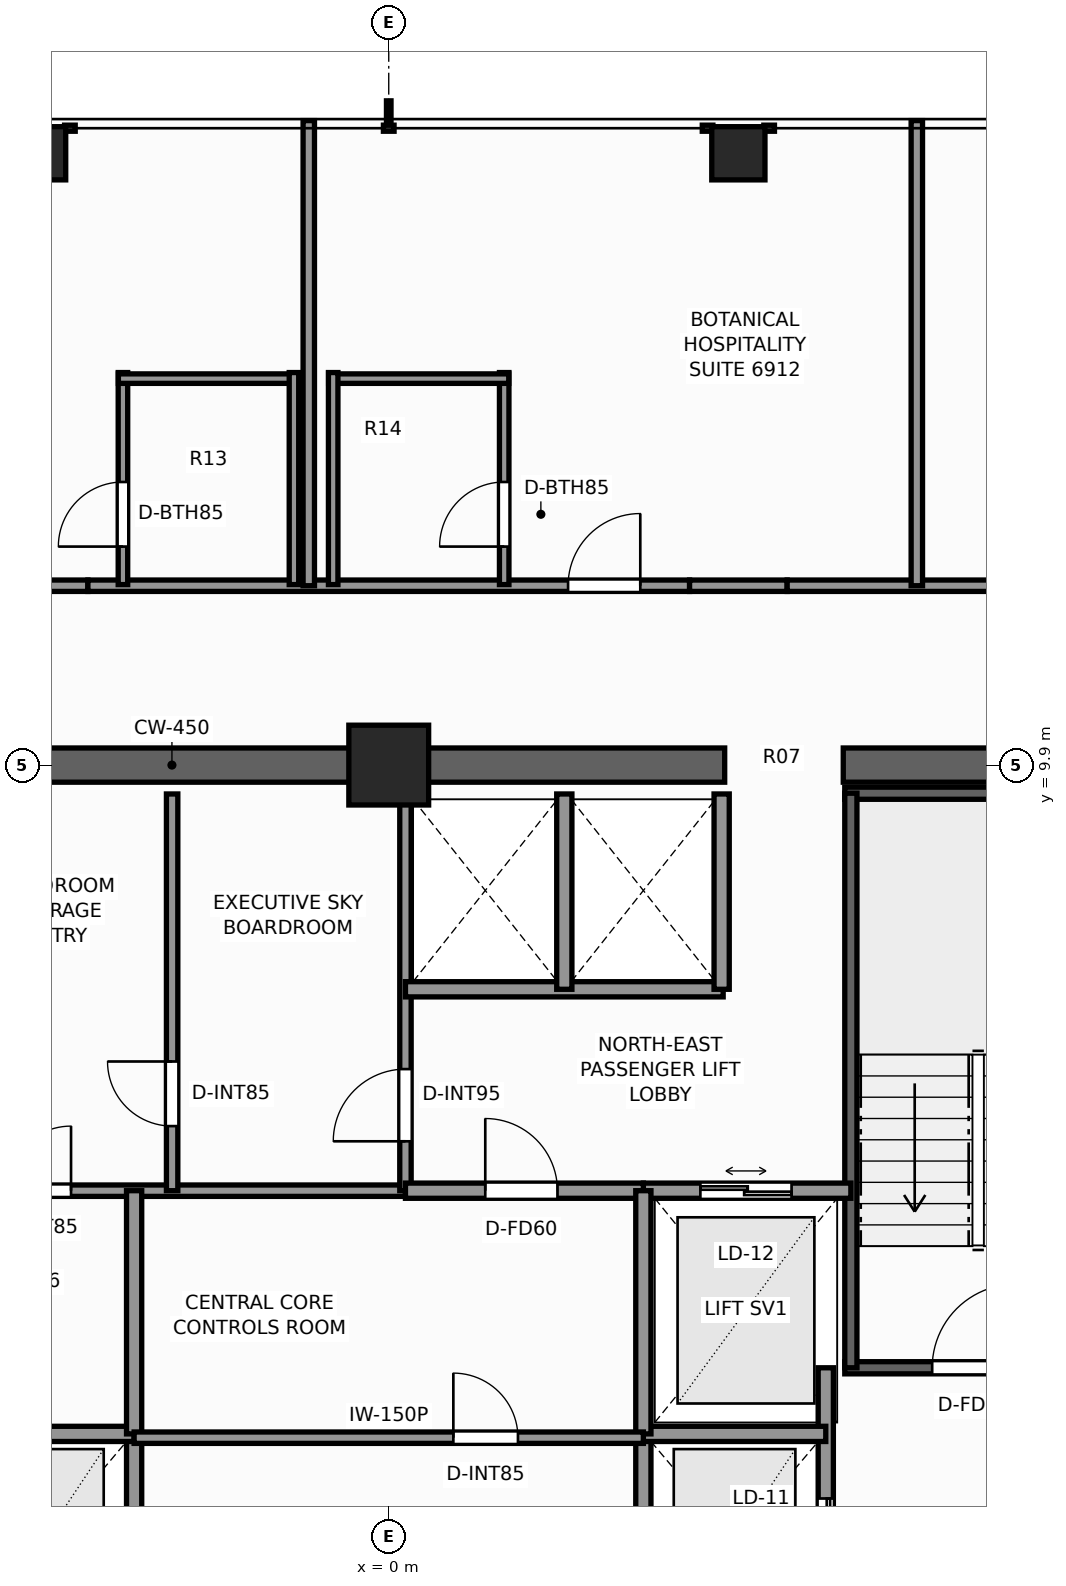
"""IFC4 building model, lengths in metres.
Left out: names, types, materials, properties, quantities, classifications, styles, units other than length and angle.
Written with IfcOpenShell. Run it as: python <this file> out.ifc"""

import sys

from ifc_helpers import new_model, si_unit, direction, frame, frame_2d, origin, origin_2d, place, context, subcontext, project, spatial, rectangle, extrude, element, fill, save


model = new_model("IFC4")
c1 = context("Model", 3, precision=1e-05, world=origin(), true_north=direction((0.0, 1.0)))
c2 = subcontext(c1, "Body", "Model", "MODEL_VIEW")
j1 = project(units=[si_unit("LENGTHUNIT", "METRE"), si_unit("PLANEANGLEUNIT", "RADIAN")], contexts=[c1])
p1 = place(None, origin())
s1 = spatial("IfcSite", under=j1, at=p1, CompositionType="ELEMENT")
p2 = place(p1, origin())
s2 = spatial("IfcBuilding", under=s1, at=p2, CompositionType="ELEMENT")
p3 = place(p2, frame((0.0, 0.0, 237.4)))
s3 = spatial("IfcBuildingStorey", under=s2, at=p3, CompositionType="ELEMENT", Elevation=237.4)
p4 = place(p3, frame((-10.125, 9.9, 0.0), z_axis=(0.0, 0.0, 1.0), x_axis=(1.0, 0.0, 0.0)))
e1 = element("IfcWall", 1, at=p4, inside=s3, PredefinedType="SHEAR", context=c2, shape_type="SweptSolid", body=[
    extrude(rectangle(XDim=14.545, YDim=0.45, at=frame_2d((7.272, 0.0))), origin(), (0.0, 0.0, 1.0), 3.5),
])
p5 = place(p3, frame((5.98, 9.9, 0.0), z_axis=(0.0, 0.0, 1.0), x_axis=(1.0, 0.0, 0.0)))
e2 = element("IfcWall", 2, at=p5, inside=s3, PredefinedType="SHEAR", context=c2, shape_type="SweptSolid", body=[
    extrude(rectangle(XDim=4.145, YDim=0.45, at=frame_2d((2.073, 0.0))), origin(), (0.0, 0.0, 1.0), 3.5),
])
p6 = place(p3, frame((0.0, 9.9, 0.0), z_axis=(0.0, 0.0, 1.0), x_axis=(1.0, 0.0, 0.0)))
e3 = element("IfcColumn", 3, at=p6, inside=s3, PredefinedType="COLUMN", context=c2, shape_type="SweptSolid", body=[
    extrude(rectangle(XDim=1.05, YDim=1.05, at=origin_2d()), origin(), (0.0, 0.0, 1.0), 3.5),
])
for number, where, z_axis, x_axis in (
    (4, (-4.6, 17.95, 0.0), (0.0, 0.0, 1.0), (1.0, 0.0, 0.0)),
    (5, (4.6, 17.95, 0.0), (0.0, 0.0, 1.0), (1.0, 0.0, 0.0)),
):
    element("IfcColumn", number, at=place(p3, frame(where, z_axis=z_axis, x_axis=x_axis)), inside=s3, PredefinedType="COLUMN", context=c2, shape_type="SweptSolid", body=[
        extrude(rectangle(XDim=0.7, YDim=0.7, at=origin_2d()), origin(), (0.0, 0.0, 1.0), 3.5),
    ])
p7 = place(p3, frame((6.0, 1.97, 0.0), z_axis=(0.0, 0.0, 1.0), x_axis=(1.0, 0.0, 0.0)))
e6 = element("IfcWall", 6, at=p7, inside=s3, PredefinedType="SHEAR", context=c2, shape_type="SweptSolid", body=[
    extrude(rectangle(XDim=3.52, YDim=0.16, at=frame_2d((1.76, 0.0))), origin(), (0.0, 0.0, 1.0), 3.5),
])
p8 = place(p7, frame((1.15, 0.0, 0.0)))
e7 = element("IfcOpeningElement", 7, at=p8, cuts=e6, PredefinedType="OPENING", context=c2, shape_type="SweptSolid", body=[
    extrude(rectangle(XDim=1.1, YDim=2.2, at=frame_2d((0.55, 1.1))), frame((0.0, 0.09, 0.0), z_axis=(0.0, -1.0, 0.0), x_axis=(1.0, 0.0, 0.0)), (0.0, 0.0, 1.0), 0.18),
])
p9 = place(p3, frame((6.0, 9.53, 0.0), z_axis=(0.0, 0.0, 1.0), x_axis=(1.0, 0.0, 0.0)))
e8 = element("IfcWall", 8, at=p9, inside=s3, PredefinedType="SHEAR", context=c2, shape_type="SweptSolid", body=[
    extrude(rectangle(XDim=3.52, YDim=0.16, at=frame_2d((1.76, 0.0))), origin(), (0.0, 0.0, 1.0), 3.5),
])
p10 = place(p3, frame((6.08, 1.97, 0.0), z_axis=(0.0, 0.0, 1.0), x_axis=(0.0, 1.0, 0.0)))
e9 = element("IfcWall", 9, at=p10, inside=s3, PredefinedType="SHEAR", context=c2, shape_type="SweptSolid", body=[
    extrude(rectangle(XDim=7.56, YDim=0.16, at=frame_2d((3.78, 0.0))), origin(), (0.0, 0.0, 1.0), 3.5),
])
p11 = place(p3, frame((-3.35, -1.7, 0.0), z_axis=(0.0, 0.0, 1.0), x_axis=(0.0, 1.0, 0.0)))
e10 = element("IfcWall", 10, at=p11, inside=s3, PredefinedType="SOLIDWALL", context=c2, shape_type="SweptSolid", body=[
    extrude(rectangle(XDim=2.8, YDim=0.2, at=frame_2d((1.4, 0.0))), origin(), (0.0, 0.0, 1.0), 3.25),
])
p12 = place(p3, frame((-5.75, 1.1, 0.0), z_axis=(0.0, 0.0, 1.0), x_axis=(1.0, 0.0, 0.0)))
e11 = element("IfcWall", 11, at=p12, inside=s3, PredefinedType="SOLIDWALL", context=c2, shape_type="SweptSolid", body=[
    extrude(rectangle(XDim=2.4, YDim=0.2, at=frame_2d((1.2, 0.0))), origin(), (0.0, 0.0, 1.0), 3.25),
])
p13 = place(p3, frame((5.75, -3.6, 0.0), z_axis=(0.0, 0.0, 1.0), x_axis=(0.0, 1.0, 0.0)))
e12 = element("IfcWall", 12, at=p13, inside=s3, PredefinedType="SOLIDWALL", context=c2, shape_type="SweptSolid", body=[
    extrude(rectangle(XDim=5.57, YDim=0.2, at=frame_2d((2.785, 0.0))), origin(), (0.0, 0.0, 1.0), 3.25),
])
p14 = place(p13, frame((2.75, 0.0, 0.0)))
e13 = element("IfcOpeningElement", 13, at=p14, cuts=e12, PredefinedType="OPENING", context=c2, shape_type="SweptSolid", body=[
    extrude(rectangle(XDim=1.1, YDim=2.2, at=frame_2d((0.55, 1.1))), frame((0.0, 0.11, 0.0), z_axis=(0.0, -1.0, 0.0), x_axis=(1.0, 0.0, 0.0)), (0.0, 0.0, 1.0), 0.22),
])
p15 = place(p3, frame((3.35, -1.7, 0.0), z_axis=(0.0, 0.0, 1.0), x_axis=(0.0, 1.0, 0.0)))
e14 = element("IfcWall", 14, at=p15, inside=s3, PredefinedType="SOLIDWALL", context=c2, shape_type="SweptSolid", body=[
    extrude(rectangle(XDim=2.8, YDim=0.2, at=frame_2d((1.4, 0.0))), origin(), (0.0, 0.0, 1.0), 3.25),
])
p16 = place(p3, frame((3.35, 1.1, 0.0), z_axis=(0.0, 0.0, 1.0), x_axis=(1.0, 0.0, 0.0)))
e15 = element("IfcWall", 15, at=p16, inside=s3, PredefinedType="SOLIDWALL", context=c2, shape_type="SweptSolid", body=[
    extrude(rectangle(XDim=2.4, YDim=0.2, at=frame_2d((1.2, 0.0))), origin(), (0.0, 0.0, 1.0), 3.25),
])
p17 = place(p3, frame((3.35, 4.3, 0.0), z_axis=(0.0, 0.0, 1.0), x_axis=(1.0, 0.0, 0.0)))
e16 = element("IfcWall", 16, at=p17, inside=s3, PredefinedType="SOLIDWALL", context=c2, shape_type="SweptSolid", body=[
    extrude(rectangle(XDim=2.73, YDim=0.2, at=frame_2d((1.365, 0.0))), origin(), (0.0, 0.0, 1.0), 3.25),
])
p18 = place(p17, frame((0.75, 0.0, 0.0)))
e17 = element("IfcOpeningElement", 17, at=p18, cuts=e16, PredefinedType="OPENING", context=c2, shape_type="SweptSolid", body=[
    extrude(rectangle(XDim=1.2, YDim=2.25, at=frame_2d((0.6, 1.125))), frame((0.0, 0.11, 0.0), z_axis=(0.0, -1.0, 0.0), x_axis=(1.0, 0.0, 0.0)), (0.0, 0.0, 1.0), 0.22),
])
p19 = place(p3, frame((-6.08, 4.3, 0.0), z_axis=(0.0, 0.0, 1.0), x_axis=(1.0, 0.0, 0.0)))
e18 = element("IfcWall", 18, at=p19, inside=s3, PredefinedType="PARTITIONING", context=c2, shape_type="SweptSolid", body=[
    extrude(rectangle(XDim=6.3, YDim=0.15, at=frame_2d((3.15, 0.0))), origin(), (0.0, 0.0, 1.0), 3.25),
])
p20 = place(p19, frame((1.05, 0.0, 0.0)))
e19 = element("IfcOpeningElement", 19, at=p20, cuts=e18, PredefinedType="OPENING", context=c2, shape_type="SweptSolid", body=[
    extrude(rectangle(XDim=0.85, YDim=2.03, at=frame_2d((0.425, 1.015))), frame((0.0, 0.085, 0.0), z_axis=(0.0, -1.0, 0.0), x_axis=(1.0, 0.0, 0.0)), (0.0, 0.0, 1.0), 0.17),
])
p21 = place(p3, frame((0.22, 4.3, 0.0), z_axis=(0.0, 0.0, 1.0), x_axis=(0.0, 1.0, 0.0)))
e20 = element("IfcWall", 20, at=p21, inside=s3, PredefinedType="PARTITIONING", context=c2, shape_type="SweptSolid", body=[
    extrude(rectangle(XDim=5.22, YDim=0.15, at=frame_2d((2.61, 0.0))), origin(), (0.0, 0.0, 1.0), 3.25),
])
p22 = place(p21, frame((0.65, 0.0, 0.0)))
e21 = element("IfcOpeningElement", 21, at=p22, cuts=e20, PredefinedType="OPENING", context=c2, shape_type="SweptSolid", body=[
    extrude(rectangle(XDim=0.95, YDim=2.06, at=frame_2d((0.475, 1.03))), frame((0.0, 0.085, 0.0), z_axis=(0.0, -1.0, 0.0), x_axis=(1.0, 0.0, 0.0)), (0.0, 0.0, 1.0), 0.17),
])
p23 = place(p3, frame((-2.85, 4.3, 0.0), z_axis=(0.0, 0.0, 1.0), x_axis=(0.0, 1.0, 0.0)))
e22 = element("IfcWall", 22, at=p23, inside=s3, PredefinedType="PARTITIONING", context=c2, shape_type="SweptSolid", body=[
    extrude(rectangle(XDim=5.22, YDim=0.15, at=frame_2d((2.61, 0.0))), origin(), (0.0, 0.0, 1.0), 3.25),
])
p24 = place(p23, frame((0.85, 0.0, 0.0)))
e23 = element("IfcOpeningElement", 23, at=p24, cuts=e22, PredefinedType="OPENING", context=c2, shape_type="SweptSolid", body=[
    extrude(rectangle(XDim=0.85, YDim=2.03, at=frame_2d((0.425, 1.015))), frame((0.0, 0.085, 0.0), z_axis=(0.0, -1.0, 0.0), x_axis=(1.0, 0.0, 0.0)), (0.0, 0.0, 1.0), 0.17),
])
p25 = place(p3, frame((0.22, 6.95, 0.0), z_axis=(0.0, 0.0, 1.0), x_axis=(1.0, 0.0, 0.0)))
e24 = element("IfcWall", 24, at=p25, inside=s3, PredefinedType="SOLIDWALL", context=c2, shape_type="SweptSolid", body=[
    extrude(rectangle(XDim=4.18, YDim=0.2, at=frame_2d((2.09, 0.0))), origin(), (0.0, 0.0, 1.0), 3.25),
])
for number, where, z_axis, x_axis in (
    (25, (4.38, 6.95, 0.0), (0.0, 0.0, 1.0), (0.0, 1.0, 0.0)),
    (26, (2.31, 6.95, 0.0), (0.0, 0.0, 1.0), (0.0, 1.0, 0.0)),
):
    element("IfcWall", number, at=place(p3, frame(where, z_axis=z_axis, x_axis=x_axis)), inside=s3, PredefinedType="SOLIDWALL", context=c2, shape_type="SweptSolid", body=[
        extrude(rectangle(XDim=2.57, YDim=0.2, at=frame_2d((1.285, 0.0))), origin(), (0.0, 0.0, 1.0), 3.25),
    ])
p26 = place(p3, frame((0.22, 4.3, 0.0), z_axis=(0.0, 0.0, 1.0), x_axis=(1.0, 0.0, 0.0)))
e27 = element("IfcWall", 27, at=p26, inside=s3, PredefinedType="SOLIDWALL", context=c2, shape_type="SweptSolid", body=[
    extrude(rectangle(XDim=3.13, YDim=0.2, at=frame_2d((1.565, 0.0))), origin(), (0.0, 0.0, 1.0), 3.25),
])
p27 = place(p26, frame((1.05, 0.0, 0.0)))
e28 = element("IfcOpeningElement", 28, at=p27, cuts=e27, PredefinedType="OPENING", context=c2, shape_type="SweptSolid", body=[
    extrude(rectangle(XDim=0.95, YDim=2.06, at=frame_2d((0.475, 1.03))), frame((0.0, 0.11, 0.0), z_axis=(0.0, -1.0, 0.0), x_axis=(1.0, 0.0, 0.0)), (0.0, 0.0, 1.0), 0.22),
])
for number, where, z_axis, x_axis in (
    (29, (-3.35, 1.1, 0.0), (0.0, 0.0, 1.0), (0.0, 1.0, 0.0)),
    (30, (3.35, 1.1, 0.0), (0.0, 0.0, 1.0), (0.0, 1.0, 0.0)),
):
    element("IfcWall", number, at=place(p3, frame(where, z_axis=z_axis, x_axis=x_axis)), inside=s3, PredefinedType="SOLIDWALL", context=c2, shape_type="SweptSolid", body=[
        extrude(rectangle(XDim=3.2, YDim=0.2, at=frame_2d((1.6, 0.0))), origin(), (0.0, 0.0, 1.0), 3.25),
    ])
p28 = place(p3, frame((-3.35, 1.05, 0.0), z_axis=(0.0, 0.0, 1.0), x_axis=(1.0, 0.0, 0.0)))
e31 = element("IfcWall", 31, at=p28, inside=s3, PredefinedType="PARTITIONING", context=c2, shape_type="SweptSolid", body=[
    extrude(rectangle(XDim=6.7, YDim=0.15, at=frame_2d((3.35, 0.0))), origin(), (0.0, 0.0, 1.0), 3.25),
])
p29 = place(p28, frame((4.2, 0.0, 0.0)))
e32 = element("IfcOpeningElement", 32, at=p29, cuts=e31, PredefinedType="OPENING", context=c2, shape_type="SweptSolid", body=[
    extrude(rectangle(XDim=0.85, YDim=2.03, at=frame_2d((0.425, 1.015))), frame((0.0, 0.085, 0.0), z_axis=(0.0, -1.0, 0.0), x_axis=(1.0, 0.0, 0.0)), (0.0, 0.0, 1.0), 0.17),
])
p30 = place(p3, frame((-5.242, 12.26, 0.0), z_axis=(0.0, 0.0, 1.0), x_axis=(1.0, 0.0, 0.0)))
e33 = element("IfcWall", 33, at=p30, inside=s3, PredefinedType="PARTITIONING", context=c2, shape_type="SweptSolid", body=[
    extrude(rectangle(XDim=1.284, YDim=0.15, at=frame_2d((0.642, 0.0))), origin(), (0.0, 0.0, 1.0), 1.435),
])
p31 = place(p3, frame((-3.958, 12.26, 0.0), z_axis=(0.0, 0.0, 1.0), x_axis=(1.0, 0.0, 0.0)))
e34 = element("IfcWall", 34, at=p31, inside=s3, PredefinedType="PARTITIONING", context=c2, shape_type="SweptSolid", body=[
    extrude(rectangle(XDim=7.916, YDim=0.15, at=frame_2d((3.958, 0.0))), origin(), (0.0, 0.0, 1.0), 2.539),
])
p32 = place(p31, frame((6.317, 0.0, 0.0)))
e35 = element("IfcOpeningElement", 35, at=p32, cuts=e34, PredefinedType="OPENING", context=c2, shape_type="SweptSolid", body=[
    extrude(rectangle(XDim=0.95, YDim=2.06, at=frame_2d((0.475, 1.03))), frame((0.0, 0.085, 0.0), z_axis=(0.0, -1.0, 0.0), x_axis=(1.0, 0.0, 0.0)), (0.0, 0.0, 1.0), 0.17),
])
p33 = place(p3, frame((3.958, 12.26, 0.0), z_axis=(0.0, 0.0, 1.0), x_axis=(1.0, 0.0, 0.0)))
e36 = element("IfcWall", 36, at=p33, inside=s3, PredefinedType="PARTITIONING", context=c2, shape_type="SweptSolid", body=[
    extrude(rectangle(XDim=1.284, YDim=0.15, at=frame_2d((0.642, 0.0))), origin(), (0.0, 0.0, 1.0), 1.435),
])
p34 = place(p3, frame((5.242, 12.26, 0.0), z_axis=(0.0, 0.0, 1.0), x_axis=(1.0, 0.0, 0.0)))
e37 = element("IfcWall", 37, at=p34, inside=s3, PredefinedType="PARTITIONING", context=c2, shape_type="SweptSolid", body=[
    extrude(rectangle(XDim=4.589, YDim=0.15, at=frame_2d((2.294, 0.0))), origin(), (0.0, 0.0, 1.0), 3.25),
])
p35 = place(p34, frame((2.674, 0.0, 0.0)))
e38 = element("IfcOpeningElement", 38, at=p35, cuts=e37, PredefinedType="OPENING", context=c2, shape_type="SweptSolid", body=[
    extrude(rectangle(XDim=0.9, YDim=2.06, at=frame_2d((0.45, 1.03))), frame((0.0, 0.085, 0.0), z_axis=(0.0, -1.0, 0.0), x_axis=(1.0, 0.0, 0.0)), (0.0, 0.0, 1.0), 0.17),
])
p36 = place(p3, frame((-1.052, 12.26, 0.0), z_axis=(0.0, 0.0, 1.0), x_axis=(0.0, 1.0, 0.0)))
e39 = element("IfcWall", 39, at=p36, inside=s3, PredefinedType="PARTITIONING", context=c2, shape_type="SweptSolid", body=[
    extrude(rectangle(XDim=6.12, YDim=0.15, at=frame_2d((3.06, 0.0))), origin(), (0.0, 0.0, 1.0), 2.623),
])
p37 = place(p3, frame((-3.497, 12.275, 0.0), z_axis=(0.0, 0.0, 1.0), x_axis=(0.0, 1.0, 0.0)))
e40 = element("IfcWall", 40, at=p37, inside=s3, PredefinedType="PARTITIONING", context=c2, shape_type="SweptSolid", body=[
    extrude(rectangle(XDim=2.79, YDim=0.125, at=frame_2d((1.395, 0.0))), origin(), (0.0, 0.0, 1.0), 3.25),
])
p38 = place(p37, frame((0.5, 0.0, 0.0)))
e41 = element("IfcOpeningElement", 41, at=p38, cuts=e40, PredefinedType="OPENING", context=c2, shape_type="SweptSolid", body=[
    extrude(rectangle(XDim=0.85, YDim=2.03, at=frame_2d((0.425, 1.015))), frame((0.0, 0.073, 0.0), z_axis=(0.0, -1.0, 0.0), x_axis=(1.0, 0.0, 0.0)), (0.0, 0.0, 1.0), 0.145),
])
p39 = place(p3, frame((-3.557, 14.985, 0.0), z_axis=(0.0, 0.0, 1.0), x_axis=(1.0, 0.0, 0.0)))
e42 = element("IfcWall", 42, at=p39, inside=s3, PredefinedType="PARTITIONING", context=c2, shape_type="SweptSolid", body=[
    extrude(rectangle(XDim=2.37, YDim=0.125, at=frame_2d((1.185, 0.0))), origin(), (0.0, 0.0, 1.0), 2.539),
])
p40 = place(p3, frame((-1.247, 12.275, 0.0), z_axis=(0.0, 0.0, 1.0), x_axis=(0.0, 1.0, 0.0)))
e43 = element("IfcWall", 43, at=p40, inside=s3, PredefinedType="PARTITIONING", context=c2, shape_type="SweptSolid", body=[
    extrude(rectangle(XDim=2.79, YDim=0.125, at=frame_2d((1.395, 0.0))), origin(), (0.0, 0.0, 1.0), 3.25),
])
p41 = place(p3, frame((6.948, 12.26, 0.0), z_axis=(0.0, 0.0, 1.0), x_axis=(0.0, 1.0, 0.0)))
e44 = element("IfcWall", 44, at=p41, inside=s3, PredefinedType="PARTITIONING", context=c2, shape_type="SweptSolid", body=[
    extrude(rectangle(XDim=6.12, YDim=0.15, at=frame_2d((3.06, 0.0))), origin(), (0.0, 0.0, 1.0), 2.623),
])
p42 = place(p3, frame((1.519, 12.275, 0.0), z_axis=(0.0, 0.0, 1.0), x_axis=(0.0, 1.0, 0.0)))
e45 = element("IfcWall", 45, at=p42, inside=s3, PredefinedType="PARTITIONING", context=c2, shape_type="SweptSolid", body=[
    extrude(rectangle(XDim=2.79, YDim=0.125, at=frame_2d((1.395, 0.0))), origin(), (0.0, 0.0, 1.0), 3.25),
])
p43 = place(p42, frame((0.5, 0.0, 0.0)))
e46 = element("IfcOpeningElement", 46, at=p43, cuts=e45, PredefinedType="OPENING", context=c2, shape_type="SweptSolid", body=[
    extrude(rectangle(XDim=0.85, YDim=2.03, at=frame_2d((0.425, 1.015))), frame((0.0, 0.073, 0.0), z_axis=(0.0, -1.0, 0.0), x_axis=(1.0, 0.0, 0.0)), (0.0, 0.0, 1.0), 0.145),
])
p44 = place(p3, frame((-0.791, 14.985, 0.0), z_axis=(0.0, 0.0, 1.0), x_axis=(1.0, 0.0, 0.0)))
e47 = element("IfcWall", 47, at=p44, inside=s3, PredefinedType="PARTITIONING", context=c2, shape_type="SweptSolid", body=[
    extrude(rectangle(XDim=2.37, YDim=0.125, at=frame_2d((1.185, 0.0))), origin(), (0.0, 0.0, 1.0), 2.775),
])
p45 = place(p3, frame((-0.731, 12.275, 0.0), z_axis=(0.0, 0.0, 1.0), x_axis=(0.0, 1.0, 0.0)))
e48 = element("IfcWall", 48, at=p45, inside=s3, PredefinedType="PARTITIONING", context=c2, shape_type="SweptSolid", body=[
    extrude(rectangle(XDim=2.79, YDim=0.125, at=frame_2d((1.395, 0.0))), origin(), (0.0, 0.0, 1.0), 3.25),
])
p46 = place(p8, origin())
e49 = element("IfcDoor", 49, at=p46, inside=s3, OperationType="SINGLE_SWING_RIGHT", PredefinedType="DOOR", context=c2, shape_type="SweptSolid", body=[
    extrude(rectangle(XDim=1.1, YDim=2.2, at=frame_2d((0.55, 1.1))), frame((0.0, 0.025, 0.0), z_axis=(0.0, -1.0, 0.0), x_axis=(1.0, 0.0, 0.0)), (0.0, 0.0, 1.0), 0.05),
])
fill(e7, e49)
p47 = place(p14, origin())
e50 = element("IfcDoor", 50, at=p47, inside=s3, OperationType="DOUBLE_DOOR_SLIDING", PredefinedType="DOOR", context=c2, shape_type="SweptSolid", body=[
    extrude(rectangle(XDim=1.1, YDim=2.2, at=frame_2d((0.55, 1.1))), frame((0.0, 0.025, 0.0), z_axis=(0.0, -1.0, 0.0), x_axis=(1.0, 0.0, 0.0)), (0.0, 0.0, 1.0), 0.05),
])
fill(e13, e50)
p48 = place(p18, origin())
e51 = element("IfcDoor", 51, at=p48, inside=s3, OperationType="DOUBLE_DOOR_SLIDING", PredefinedType="DOOR", context=c2, shape_type="SweptSolid", body=[
    extrude(rectangle(XDim=1.2, YDim=2.25, at=frame_2d((0.6, 1.125))), frame((0.0, 0.025, 0.0), z_axis=(0.0, -1.0, 0.0), x_axis=(1.0, 0.0, 0.0)), (0.0, 0.0, 1.0), 0.05),
])
fill(e17, e51)
p49 = place(p22, origin())
e52 = element("IfcDoor", 52, at=p49, inside=s3, OperationType="SINGLE_SWING_LEFT", PredefinedType="DOOR", context=c2, shape_type="SweptSolid", body=[
    extrude(rectangle(XDim=0.95, YDim=2.06, at=frame_2d((0.475, 1.03))), frame((0.0, 0.025, 0.0), z_axis=(0.0, -1.0, 0.0), x_axis=(1.0, 0.0, 0.0)), (0.0, 0.0, 1.0), 0.05),
])
fill(e21, e52)
p50 = place(p24, origin())
e53 = element("IfcDoor", 53, at=p50, inside=s3, OperationType="SINGLE_SWING_RIGHT", PredefinedType="DOOR", context=c2, shape_type="SweptSolid", body=[
    extrude(rectangle(XDim=0.85, YDim=2.03, at=frame_2d((0.425, 1.015))), frame((0.0, 0.025, 0.0), z_axis=(0.0, -1.0, 0.0), x_axis=(1.0, 0.0, 0.0)), (0.0, 0.0, 1.0), 0.05),
])
fill(e23, e53)
p51 = place(p27, origin())
e54 = element("IfcDoor", 54, at=p51, inside=s3, OperationType="SINGLE_SWING_LEFT", PredefinedType="DOOR", context=c2, shape_type="SweptSolid", body=[
    extrude(rectangle(XDim=0.95, YDim=2.06, at=frame_2d((0.475, 1.03))), frame((0.0, 0.025, 0.0), z_axis=(0.0, -1.0, 0.0), x_axis=(1.0, 0.0, 0.0)), (0.0, 0.0, 1.0), 0.05),
])
fill(e28, e54)
p52 = place(p29, origin())
e55 = element("IfcDoor", 55, at=p52, inside=s3, OperationType="SINGLE_SWING_LEFT", PredefinedType="DOOR", context=c2, shape_type="SweptSolid", body=[
    extrude(rectangle(XDim=0.85, YDim=2.03, at=frame_2d((0.425, 1.015))), frame((0.0, 0.025, 0.0), z_axis=(0.0, -1.0, 0.0), x_axis=(1.0, 0.0, 0.0)), (0.0, 0.0, 1.0), 0.05),
])
fill(e32, e55)
p53 = place(p20, origin())
e56 = element("IfcDoor", 56, at=p53, inside=s3, OperationType="SINGLE_SWING_RIGHT", PredefinedType="DOOR", context=c2, shape_type="SweptSolid", body=[
    extrude(rectangle(XDim=0.85, YDim=2.03, at=frame_2d((0.425, 1.015))), frame((0.0, 0.025, 0.0), z_axis=(0.0, -1.0, 0.0), x_axis=(1.0, 0.0, 0.0)), (0.0, 0.0, 1.0), 0.05),
])
fill(e19, e56)
p54 = place(p38, origin())
e57 = element("IfcDoor", 57, at=p54, inside=s3, OperationType="SINGLE_SWING_LEFT", PredefinedType="DOOR", context=c2, shape_type="SweptSolid", body=[
    extrude(rectangle(XDim=0.85, YDim=2.03, at=frame_2d((0.425, 1.015))), frame((0.0, 0.025, 0.0), z_axis=(0.0, -1.0, 0.0), x_axis=(1.0, 0.0, 0.0)), (0.0, 0.0, 1.0), 0.05),
])
fill(e41, e57)
p55 = place(p43, origin())
e58 = element("IfcDoor", 58, at=p55, inside=s3, OperationType="SINGLE_SWING_LEFT", PredefinedType="DOOR", context=c2, shape_type="SweptSolid", body=[
    extrude(rectangle(XDim=0.85, YDim=2.03, at=frame_2d((0.425, 1.015))), frame((0.0, 0.025, 0.0), z_axis=(0.0, -1.0, 0.0), x_axis=(1.0, 0.0, 0.0)), (0.0, 0.0, 1.0), 0.05),
])
fill(e46, e58)
p56 = place(p32, origin())
e59 = element("IfcDoor", 59, at=p56, inside=s3, OperationType="SINGLE_SWING_RIGHT", PredefinedType="DOOR", context=c2, shape_type="SweptSolid", body=[
    extrude(rectangle(XDim=0.95, YDim=2.06, at=frame_2d((0.475, 1.03))), frame((0.0, 0.025, 0.0), z_axis=(0.0, -1.0, 0.0), x_axis=(1.0, 0.0, 0.0)), (0.0, 0.0, 1.0), 0.05),
])
fill(e35, e59)
save(model, sys.argv[1])
